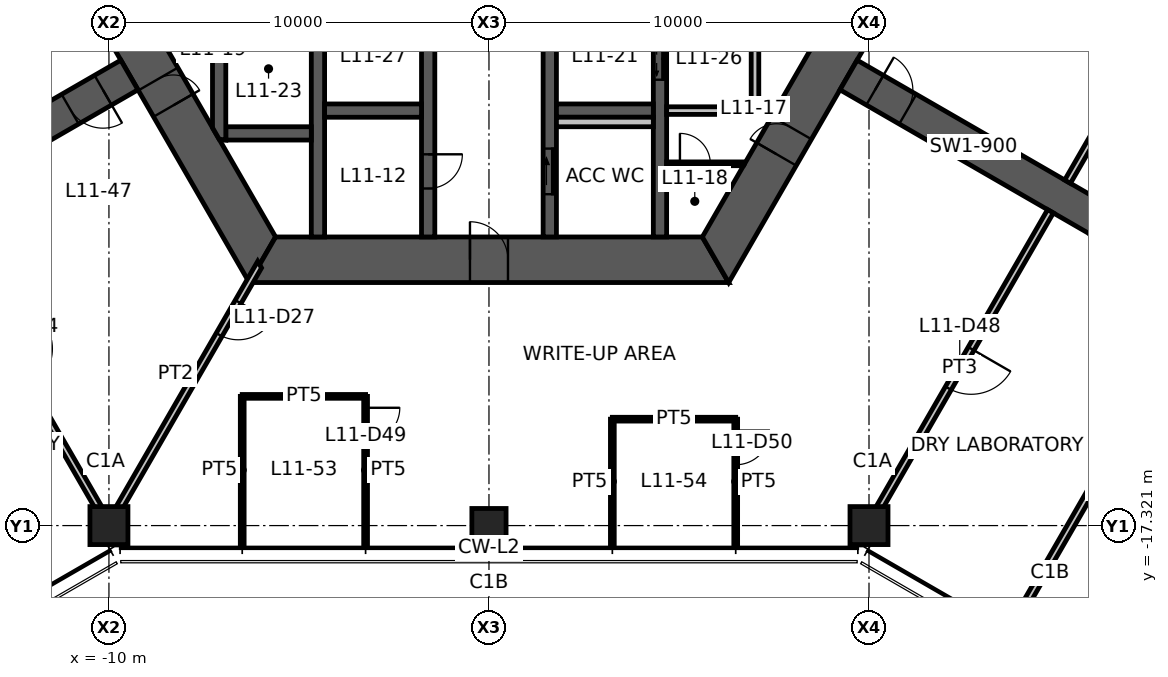
"""IFC4 building model, lengths in metres.
Left out: names, types, materials, properties, quantities, classifications, styles, units other than length and angle.
Written with IfcOpenShell. Run it as: python <this file> out.ifc"""

import sys

from ifc_helpers import new_model, si_unit, direction, frame, frame_2d, origin, origin_2d, place, context, subcontext, project, spatial, polyline, rectangle, hollow_rectangle, outline, extrude, element, fill, save


model = new_model("IFC4")
c1 = context("Model", 3, precision=1e-05, world=origin(), true_north=direction((0.0, 1.0)))
c2 = subcontext(c1, "Body", "Model", "MODEL_VIEW")
j1 = project(units=[si_unit("LENGTHUNIT", "METRE"), si_unit("PLANEANGLEUNIT", "RADIAN")], contexts=[c1])
p1 = place(None, origin())
s1 = spatial("IfcSite", under=j1, at=p1, CompositionType="ELEMENT")
p2 = place(p1, origin())
s2 = spatial("IfcBuilding", under=s1, at=p2, CompositionType="ELEMENT")
p3 = place(p2, frame((0.0, 0.0, 43.6)))
s3 = spatial("IfcBuildingStorey", under=s2, at=p3, CompositionType="ELEMENT", Elevation=43.6)
for number, where, z_axis, x_axis in (
    (1, (-10.0, -17.321, 0.0), (0.0, 0.0, 1.0), (1.0, 0.0, 0.0)),
    (2, (10.0, -17.321, 0.0), (0.0, 0.0, 1.0), (1.0, 0.0, 0.0)),
):
    element("IfcColumn", number, at=place(p3, frame(where, z_axis=z_axis, x_axis=x_axis)), inside=s3, PredefinedType="COLUMN", context=c2, shape_type="SweptSolid", body=[
        extrude(hollow_rectangle(XDim=1.0, YDim=1.0, WallThickness=0.06, at=origin_2d()), origin(), (0.0, 0.0, 1.0), 4.2),
    ])
p4 = place(p3, frame((0.0, -17.321, 0.0), z_axis=(0.0, 0.0, 1.0), x_axis=(1.0, 0.0, 0.0)))
e3 = element("IfcColumn", 3, at=p4, inside=s3, PredefinedType="COLUMN", context=c2, shape_type="SweptSolid", body=[
    extrude(hollow_rectangle(XDim=0.9, YDim=0.9, WallThickness=0.05, at=origin_2d()), origin(), (0.0, 0.0, 1.0), 4.2),
])
p5 = place(p3, frame((-11.922, 0.0, 0.0), z_axis=(0.0, 0.0, 1.0), x_axis=(0.500004296715, -0.866022923061, 0.0)))
e4 = element("IfcWall", 4, at=p5, inside=s3, PredefinedType="SHEAR", context=c2, shape_type="SweptSolid", body=[
    extrude(outline(polyline([(-0.346, -0.6), (6.431, -0.6), (7.231, -0.6), (12.269, -0.6), (11.576, 0.6), (7.231, 0.6), (6.431, 0.6), (0.346, 0.6), (-0.346, -0.6)])), origin(), (0.0, 0.0, 1.0), 4.2),
])
p6 = place(p5, frame((6.431, 0.0, 0.0)))
e5 = element("IfcOpeningElement", 5, at=p6, cuts=e4, PredefinedType="OPENING", context=c2, shape_type="SweptSolid", body=[
    extrude(rectangle(XDim=0.8, YDim=2.1, at=frame_2d((0.4, 1.05))), frame((0.0, 0.61, 0.0), z_axis=(0.0, -1.0, 0.0), x_axis=(1.0, 0.0, 0.0)), (0.0, 0.0, 1.0), 1.22),
])
p7 = place(p3, frame((-5.961, -10.325, 0.0), z_axis=(0.0, 0.0, 1.0), x_axis=(1.0, 0.0, 0.0)))
e6 = element("IfcWall", 6, at=p7, inside=s3, PredefinedType="SHEAR", context=c2, shape_type="SweptSolid", body=[
    extrude(outline(polyline([(-0.346, -0.6), (5.461, -0.6), (6.461, -0.6), (12.269, -0.6), (11.576, 0.6), (6.461, 0.6), (5.461, 0.6), (0.346, 0.6), (-0.346, -0.6)])), origin(), (0.0, 0.0, 1.0), 4.2),
])
p8 = place(p7, frame((5.461, 0.0, 0.0)))
e7 = element("IfcOpeningElement", 7, at=p8, cuts=e6, PredefinedType="OPENING", context=c2, shape_type="SweptSolid", body=[
    extrude(rectangle(XDim=1.0, YDim=2.1, at=frame_2d((0.5, 1.05))), frame((0.0, 0.61, 0.0), z_axis=(0.0, -1.0, 0.0), x_axis=(1.0, 0.0, 0.0)), (0.0, 0.0, 1.0), 1.22),
])
p9 = place(p3, frame((5.961, -10.325, 0.0), z_axis=(0.0, 0.0, 1.0), x_axis=(0.500004296715, 0.866022923061, 0.0)))
e8 = element("IfcWall", 8, at=p9, inside=s3, PredefinedType="SHEAR", context=c2, shape_type="SweptSolid", body=[
    extrude(outline(polyline([(-0.346, -0.6), (3.208, -0.6), (4.009, -0.6), (12.269, -0.6), (11.576, 0.6), (4.009, 0.6), (3.208, 0.6), (0.346, 0.6), (-0.346, -0.6)])), origin(), (0.0, 0.0, 1.0), 4.2),
])
p10 = place(p9, frame((3.208, 0.0, 0.0)))
e9 = element("IfcOpeningElement", 9, at=p10, cuts=e8, PredefinedType="OPENING", context=c2, shape_type="SweptSolid", body=[
    extrude(rectangle(XDim=0.8, YDim=2.1, at=frame_2d((0.4, 1.05))), frame((0.0, 0.61, 0.0), z_axis=(0.0, -1.0, 0.0), x_axis=(1.0, 0.0, 0.0)), (0.0, 0.0, 1.0), 1.22),
])
p11 = place(p3, frame((-9.461, -5.462, 0.0), z_axis=(0.0, 0.0, 1.0), x_axis=(-0.866019116917, -0.500010889016, 0.0)))
e10 = element("IfcWall", 10, at=p11, inside=s3, PredefinedType="SHEAR", context=c2, shape_type="SweptSolid", body=[
    extrude(rectangle(XDim=7.595, YDim=0.9, at=frame_2d((3.798, 0.0))), origin(), (0.0, 0.0, 1.0), 4.2),
])
p12 = place(p11, frame((0.8, 0.0, 0.0)))
e11 = element("IfcOpeningElement", 11, at=p12, cuts=e10, PredefinedType="OPENING", context=c2, shape_type="SweptSolid", body=[
    extrude(rectangle(XDim=1.0, YDim=2.1, at=frame_2d((0.5, 1.05))), frame((0.0, 0.46, 0.0), z_axis=(0.0, -1.0, 0.0), x_axis=(1.0, 0.0, 0.0)), (0.0, 0.0, 1.0), 0.92),
])
p13 = place(p3, frame((9.461, -5.462, 0.0), z_axis=(0.0, 0.0, 1.0), x_axis=(0.866019116917, -0.500010889016, 0.0)))
e12 = element("IfcWall", 12, at=p13, inside=s3, PredefinedType="SHEAR", context=c2, shape_type="SweptSolid", body=[
    extrude(rectangle(XDim=7.595, YDim=0.9, at=frame_2d((3.798, 0.0))), origin(), (0.0, 0.0, 1.0), 4.2),
])
p14 = place(p13, frame((0.8, 0.0, 0.0)))
e13 = element("IfcOpeningElement", 13, at=p14, cuts=e12, PredefinedType="OPENING", context=c2, shape_type="SweptSolid", body=[
    extrude(rectangle(XDim=1.0, YDim=2.1, at=frame_2d((0.5, 1.05))), frame((0.0, 0.46, 0.0), z_axis=(0.0, -1.0, 0.0), x_axis=(1.0, 0.0, 0.0)), (0.0, 0.0, 1.0), 0.92),
])
p15 = place(p3, frame((-1.6, -3.775, 0.0), z_axis=(0.0, 0.0, 1.0), x_axis=(0.0, -1.0, 0.0)))
e14 = element("IfcWall", 14, at=p15, inside=s3, PredefinedType="SHEAR", context=c2, shape_type="SweptSolid", body=[
    extrude(rectangle(XDim=5.95, YDim=0.35, at=frame_2d((2.975, 0.0))), origin(), (0.0, 0.0, 1.0), 4.2),
])
p16 = place(p15, frame((3.775, 0.0, 0.0)))
e15 = element("IfcOpeningElement", 15, at=p16, cuts=e14, PredefinedType="OPENING", context=c2, shape_type="SweptSolid", body=[
    extrude(rectangle(XDim=0.9, YDim=2.1, at=frame_2d((0.45, 1.05))), frame((0.0, 0.185, 0.0), z_axis=(0.0, -1.0, 0.0), x_axis=(1.0, 0.0, 0.0)), (0.0, 0.0, 1.0), 0.37),
])
p17 = place(p3, frame((1.6, -3.775, 0.0), z_axis=(0.0, 0.0, 1.0), x_axis=(0.0, -1.0, 0.0)))
e16 = element("IfcWall", 16, at=p17, inside=s3, PredefinedType="SHEAR", context=c2, shape_type="SweptSolid", body=[
    extrude(rectangle(XDim=5.95, YDim=0.35, at=frame_2d((2.975, 0.0))), origin(), (0.0, 0.0, 1.0), 4.2),
])
p18 = place(p17, frame((3.625, 0.0, 0.0)))
e17 = element("IfcOpeningElement", 17, at=p18, cuts=e16, PredefinedType="OPENING", context=c2, shape_type="SweptSolid", body=[
    extrude(rectangle(XDim=1.2, YDim=2.1, at=frame_2d((0.6, 1.05))), frame((0.0, 0.185, 0.0), z_axis=(0.0, -1.0, 0.0), x_axis=(1.0, 0.0, 0.0)), (0.0, 0.0, 1.0), 0.37),
])
p19 = place(p3, frame((-4.5, -3.775, 0.0), z_axis=(0.0, 0.0, 1.0), x_axis=(0.0, -1.0, 0.0)))
e18 = element("IfcWall", 18, at=p19, inside=s3, PredefinedType="SHEAR", context=c2, shape_type="SweptSolid", body=[
    extrude(rectangle(XDim=5.95, YDim=0.35, at=frame_2d((2.975, 0.0))), origin(), (0.0, 0.0, 1.0), 4.2),
])
p20 = place(p3, frame((4.5, -3.775, 0.0), z_axis=(0.0, 0.0, 1.0), x_axis=(0.0, -1.0, 0.0)))
e19 = element("IfcWall", 19, at=p20, inside=s3, PredefinedType="SHEAR", context=c2, shape_type="SweptSolid", body=[
    extrude(rectangle(XDim=5.95, YDim=0.35, at=frame_2d((2.975, 0.0))), origin(), (0.0, 0.0, 1.0), 4.2),
])
p21 = place(p20, frame((0.712, 0.0, 0.0)))
e20 = element("IfcOpeningElement", 20, at=p21, cuts=e19, PredefinedType="OPENING", context=c2, shape_type="SweptSolid", body=[
    extrude(rectangle(XDim=1.1, YDim=2.1, at=frame_2d((0.55, 1.05))), frame((0.0, 0.185, 0.0), z_axis=(0.0, -1.0, 0.0), x_axis=(1.0, 0.0, 0.0)), (0.0, 0.0, 1.0), 0.37),
])
for number, where, z_axis, x_axis in (
    (21, (-4.325, -6.4, 0.0), (0.0, 0.0, 1.0), (1.0, 0.0, 0.0)),
    (22, (1.775, -6.4, 0.0), (0.0, 0.0, 1.0), (1.0, 0.0, 0.0)),
):
    element("IfcWall", number, at=place(p3, frame(where, z_axis=z_axis, x_axis=x_axis)), inside=s3, PredefinedType="SHEAR", context=c2, shape_type="SweptSolid", body=[
        extrude(rectangle(XDim=2.55, YDim=0.35, at=frame_2d((1.275, 0.0))), origin(), (0.0, 0.0, 1.0), 4.2),
    ])
p22 = place(p3, frame((-6.925, -7.0, 0.0), z_axis=(0.0, 0.0, 1.0), x_axis=(1.0, 0.0, 0.0)))
e23 = element("IfcWall", 23, at=p22, inside=s3, PredefinedType="SHEAR", context=c2, shape_type="SweptSolid", body=[
    extrude(rectangle(XDim=2.25, YDim=0.35, at=frame_2d((1.125, 0.0))), origin(), (0.0, 0.0, 1.0), 4.2),
])
p23 = place(p3, frame((-7.1, -3.775, 0.0), z_axis=(0.0, 0.0, 1.0), x_axis=(0.0, -1.0, 0.0)))
e24 = element("IfcWall", 24, at=p23, inside=s3, PredefinedType="SHEAR", context=c2, shape_type="SweptSolid", body=[
    extrude(outline(polyline([(0.0, -0.175), (3.074, -0.175), (3.377, 0.0), (3.4, 0.175), (0.0, 0.175), (0.0, -0.175)])), origin(), (0.0, 0.0, 1.0), 4.2),
])
p24 = place(p3, frame((4.675, -6.4, 0.0), z_axis=(0.0, 0.0, 1.0), x_axis=(1.0, 0.0, 0.0)))
e25 = element("IfcWall", 25, at=p24, inside=s3, PredefinedType="STANDARD", context=c2, shape_type="SweptSolid", body=[
    extrude(rectangle(XDim=2.425, YDim=0.2, at=frame_2d((1.212, 0.0))), origin(), (0.0, 0.0, 1.0), 4.2),
])
p25 = place(p3, frame((7.0, -3.775, 0.0), z_axis=(0.0, 0.0, 1.0), x_axis=(0.0, -1.0, 0.0)))
e26 = element("IfcWall", 26, at=p25, inside=s3, PredefinedType="STANDARD", context=c2, shape_type="SweptSolid", body=[
    extrude(rectangle(XDim=2.525, YDim=0.2, at=frame_2d((1.263, 0.0))), origin(), (0.0, 0.0, 1.0), 4.2),
])
p26 = place(p3, frame((1.775, -6.7, 0.0), z_axis=(0.0, 0.0, 1.0), x_axis=(1.0, 0.0, 0.0)))
e27 = element("IfcWall", 27, at=p26, inside=s3, PredefinedType="PLUMBINGWALL", context=c2, shape_type="SweptSolid", body=[
    extrude(rectangle(XDim=2.55, YDim=0.25, at=frame_2d((1.275, 0.0))), origin(), (0.0, 0.0, 1.0), 4.2),
])
p27 = place(p3, frame((4.675, -7.8, 0.0), z_axis=(0.0, 0.0, 1.0), x_axis=(1.0, 0.0, 0.0)))
e28 = element("IfcWall", 28, at=p27, inside=s3, PredefinedType="PARTITIONING", context=c2, shape_type="SweptSolid", body=[
    extrude(outline(polyline([(0.0, -0.05), (0.35, -0.05), (1.15, -0.05), (2.022, -0.05), (2.051, 0.0), (2.057, 0.05), (1.15, 0.05), (0.35, 0.05), (0.0, 0.05), (0.0, -0.05)])), origin(), (0.0, 0.0, 1.0), 3.23),
])
p28 = place(p27, frame((0.35, 0.0, 0.0)))
e29 = element("IfcOpeningElement", 29, at=p28, cuts=e28, PredefinedType="OPENING", context=c2, shape_type="SweptSolid", body=[
    extrude(rectangle(XDim=0.8, YDim=2.1, at=frame_2d((0.4, 1.05))), frame((0.0, 0.06, 0.0), z_axis=(0.0, -1.0, 0.0), x_axis=(1.0, 0.0, 0.0)), (0.0, 0.0, 1.0), 0.12),
])
p29 = place(p3, frame((-6.035, -10.453, 0.0), z_axis=(0.0, 0.0, 1.0), x_axis=(-0.499993402427, -0.866029212861, 0.0)))
e30 = element("IfcWall", 30, at=p29, inside=s3, PredefinedType="PARTITIONING", context=c2, shape_type="SweptSolid", body=[
    extrude(outline(polyline([(-0.051, -0.087), (1.129, -0.087), (2.129, -0.087), (7.93, -0.087), (7.93, 0.087), (2.129, 0.087), (1.129, 0.087), (0.051, 0.087), (-0.051, -0.087)])), origin(), (0.0, 0.0, 1.0), 3.33),
])
p30 = place(p29, frame((1.129, 0.0, 0.0)))
e31 = element("IfcOpeningElement", 31, at=p30, cuts=e30, PredefinedType="OPENING", context=c2, shape_type="SweptSolid", body=[
    extrude(rectangle(XDim=1.0, YDim=2.1, at=frame_2d((0.5, 1.05))), frame((0.0, 0.098, 0.0), z_axis=(0.0, -1.0, 0.0), x_axis=(1.0, 0.0, 0.0)), (0.0, 0.0, 1.0), 0.195),
])
p31 = place(p3, frame((-14.775, -9.05, 0.0), z_axis=(0.0, 0.0, 1.0), x_axis=(0.499993908199, -0.866028920859, 0.0)))
e32 = element("IfcWall", 32, at=p31, inside=s3, PredefinedType="PARTITIONING", context=c2, shape_type="SweptSolid", body=[
    extrude(rectangle(XDim=9.55, YDim=0.175, at=frame_2d((4.775, 0.0))), origin(), (0.0, 0.0, 1.0), 3.238),
])
p32 = place(p31, frame((4.175, 0.0, 0.0)))
e33 = element("IfcOpeningElement", 33, at=p32, cuts=e32, PredefinedType="OPENING", context=c2, shape_type="SweptSolid", body=[
    extrude(rectangle(XDim=1.2, YDim=2.1, at=frame_2d((0.6, 1.05))), frame((0.0, 0.098, 0.0), z_axis=(0.0, -1.0, 0.0), x_axis=(1.0, 0.0, 0.0)), (0.0, 0.0, 1.0), 0.195),
])
p33 = place(p3, frame((15.225, -8.271, 0.0), z_axis=(0.0, 0.0, 1.0), x_axis=(0.499993908199, 0.866028920859, 0.0)))
e34 = element("IfcWall", 34, at=p33, inside=s3, PredefinedType="PARTITIONING", context=c2, shape_type="SweptSolid", body=[
    extrude(rectangle(XDim=9.55, YDim=0.175, at=frame_2d((4.775, 0.0))), origin(), (0.0, 0.0, 1.0), 3.238),
])
p34 = place(p33, frame((4.175, 0.0, 0.0)))
e35 = element("IfcOpeningElement", 35, at=p34, cuts=e34, PredefinedType="OPENING", context=c2, shape_type="SweptSolid", body=[
    extrude(rectangle(XDim=1.2, YDim=2.1, at=frame_2d((0.6, 1.05))), frame((0.0, 0.098, 0.0), z_axis=(0.0, -1.0, 0.0), x_axis=(1.0, 0.0, 0.0)), (0.0, 0.0, 1.0), 0.195),
])
p35 = place(p3, frame((14.775, -9.05, 0.0), z_axis=(0.0, 0.0, 1.0), x_axis=(-0.499993908199, -0.866028920859, 0.0)))
e36 = element("IfcWall", 36, at=p35, inside=s3, PredefinedType="PARTITIONING", context=c2, shape_type="SweptSolid", body=[
    extrude(rectangle(XDim=9.55, YDim=0.175, at=frame_2d((4.775, 0.0))), origin(), (0.0, 0.0, 1.0), 3.238),
])
p36 = place(p35, frame((4.175, 0.0, 0.0)))
e37 = element("IfcOpeningElement", 37, at=p36, cuts=e36, PredefinedType="OPENING", context=c2, shape_type="SweptSolid", body=[
    extrude(rectangle(XDim=1.2, YDim=2.1, at=frame_2d((0.6, 1.05))), frame((0.0, 0.098, 0.0), z_axis=(0.0, -1.0, 0.0), x_axis=(1.0, 0.0, 0.0)), (0.0, 0.0, 1.0), 0.195),
])
p37 = place(p3, frame((-6.493, -17.801, 0.0), z_axis=(0.0, 0.0, 1.0), x_axis=(0.0, 1.0, 0.0)))
e38 = element("IfcWall", 38, at=p37, inside=s3, PredefinedType="PARTITIONING", context=c2, shape_type="SweptSolid", body=[
    extrude(rectangle(XDim=3.88, YDim=0.1, at=frame_2d((1.94, 0.0))), origin(), (0.0, 0.0, 1.0), 3.23),
])
p38 = place(p3, frame((-6.493, -13.92, 0.0), z_axis=(0.0, 0.0, 1.0), x_axis=(1.0, 0.0, 0.0)))
e39 = element("IfcWall", 39, at=p38, inside=s3, PredefinedType="PARTITIONING", context=c2, shape_type="SweptSolid", body=[
    extrude(rectangle(XDim=3.247, YDim=0.1, at=frame_2d((1.623, 0.0))), origin(), (0.0, 0.0, 1.0), 3.23),
])
p39 = place(p3, frame((-3.246, -13.92, 0.0), z_axis=(0.0, 0.0, 1.0), x_axis=(0.0, -1.0, 0.0)))
e40 = element("IfcWall", 40, at=p39, inside=s3, PredefinedType="PARTITIONING", context=c2, shape_type="SweptSolid", body=[
    extrude(rectangle(XDim=3.88, YDim=0.1, at=frame_2d((1.94, 0.0))), origin(), (0.0, 0.0, 1.0), 3.23),
])
p40 = place(p39, frame((0.3, 0.0, 0.0)))
e41 = element("IfcOpeningElement", 41, at=p40, cuts=e40, PredefinedType="OPENING", context=c2, shape_type="SweptSolid", body=[
    extrude(rectangle(XDim=0.9, YDim=2.1, at=frame_2d((0.45, 1.05))), frame((0.0, 0.06, 0.0), z_axis=(0.0, -1.0, 0.0), x_axis=(1.0, 0.0, 0.0)), (0.0, 0.0, 1.0), 0.12),
])
p41 = place(p3, frame((3.246, -17.801, 0.0), z_axis=(0.0, 0.0, 1.0), x_axis=(0.0, 1.0, 0.0)))
e42 = element("IfcWall", 42, at=p41, inside=s3, PredefinedType="PARTITIONING", context=c2, shape_type="SweptSolid", body=[
    extrude(rectangle(XDim=3.28, YDim=0.1, at=frame_2d((1.64, 0.0))), origin(), (0.0, 0.0, 1.0), 3.23),
])
p42 = place(p3, frame((3.246, -14.521, 0.0), z_axis=(0.0, 0.0, 1.0), x_axis=(1.0, 0.0, 0.0)))
e43 = element("IfcWall", 43, at=p42, inside=s3, PredefinedType="PARTITIONING", context=c2, shape_type="SweptSolid", body=[
    extrude(rectangle(XDim=3.247, YDim=0.1, at=frame_2d((1.623, 0.0))), origin(), (0.0, 0.0, 1.0), 3.23),
])
p43 = place(p3, frame((6.493, -14.521, 0.0), z_axis=(0.0, 0.0, 1.0), x_axis=(0.0, -1.0, 0.0)))
e44 = element("IfcWall", 44, at=p43, inside=s3, PredefinedType="PARTITIONING", context=c2, shape_type="SweptSolid", body=[
    extrude(rectangle(XDim=3.28, YDim=0.1, at=frame_2d((1.64, 0.0))), origin(), (0.0, 0.0, 1.0), 3.23),
])
p44 = place(p43, frame((0.3, 0.0, 0.0)))
e45 = element("IfcOpeningElement", 45, at=p44, cuts=e44, PredefinedType="OPENING", context=c2, shape_type="SweptSolid", body=[
    extrude(rectangle(XDim=0.9, YDim=2.1, at=frame_2d((0.45, 1.05))), frame((0.0, 0.06, 0.0), z_axis=(0.0, -1.0, 0.0), x_axis=(1.0, 0.0, 0.0)), (0.0, 0.0, 1.0), 0.12),
])
p45 = place(p3, frame((18.759, -11.35, 0.0), z_axis=(0.0, 0.0, 1.0), x_axis=(-0.500005203629, -0.866022399447, 0.0)))
e46 = element("IfcWall", 46, at=p45, inside=s3, PredefinedType="PARTITIONING", context=c2, shape_type="SweptSolid", body=[
    extrude(rectangle(XDim=10.14, YDim=0.175, at=frame_2d((5.07, 0.0))), origin(), (0.0, 0.0, 1.0), 4.03),
])
p46 = place(p45, frame((4.025, 0.0, 0.0)))
e47 = element("IfcOpeningElement", 47, at=p46, cuts=e46, PredefinedType="OPENING", context=c2, shape_type="SweptSolid", body=[
    extrude(rectangle(XDim=1.5, YDim=2.1, at=frame_2d((0.75, 1.05))), frame((0.0, 0.098, 0.0), z_axis=(0.0, -1.0, 0.0), x_axis=(1.0, 0.0, 0.0)), (0.0, 0.0, 1.0), 0.195),
])
p47 = place(p8, origin())
e48 = element("IfcDoor", 48, at=p47, inside=s3, OperationType="SINGLE_SWING_LEFT", PredefinedType="DOOR", context=c2, shape_type="SweptSolid", body=[
    extrude(rectangle(XDim=1.0, YDim=2.1, at=frame_2d((0.5, 1.05))), frame((0.0, 0.025, 0.0), z_axis=(0.0, -1.0, 0.0), x_axis=(1.0, 0.0, 0.0)), (0.0, 0.0, 1.0), 0.05),
])
fill(e7, e48)
p48 = place(p10, origin())
e49 = element("IfcDoor", 49, at=p48, inside=s3, OperationType="SINGLE_SWING_LEFT", PredefinedType="DOOR", context=c2, shape_type="SweptSolid", body=[
    extrude(rectangle(XDim=0.8, YDim=2.1, at=frame_2d((0.4, 1.05))), frame((0.0, 0.025, 0.0), z_axis=(0.0, -1.0, 0.0), x_axis=(1.0, 0.0, 0.0)), (0.0, 0.0, 1.0), 0.05),
])
fill(e9, e49)
p49 = place(p6, origin())
e50 = element("IfcDoor", 50, at=p49, inside=s3, OperationType="SINGLE_SWING_RIGHT", PredefinedType="DOOR", context=c2, shape_type="SweptSolid", body=[
    extrude(rectangle(XDim=0.8, YDim=2.1, at=frame_2d((0.4, 1.05))), frame((0.0, 0.025, 0.0), z_axis=(0.0, -1.0, 0.0), x_axis=(1.0, 0.0, 0.0)), (0.0, 0.0, 1.0), 0.05),
])
fill(e5, e50)
p50 = place(p18, origin())
e51 = element("IfcDoor", 51, at=p50, inside=s3, OperationType="SLIDING_TO_LEFT", PredefinedType="DOOR", context=c2, shape_type="SweptSolid", body=[
    extrude(rectangle(XDim=1.2, YDim=2.1, at=frame_2d((0.6, 1.05))), frame((0.0, 0.025, 0.0), z_axis=(0.0, -1.0, 0.0), x_axis=(1.0, 0.0, 0.0)), (0.0, 0.0, 1.0), 0.05),
])
fill(e17, e51)
p51 = place(p16, origin())
e52 = element("IfcDoor", 52, at=p51, inside=s3, OperationType="SINGLE_SWING_LEFT", PredefinedType="DOOR", context=c2, shape_type="SweptSolid", body=[
    extrude(rectangle(XDim=0.9, YDim=2.1, at=frame_2d((0.45, 1.05))), frame((0.0, 0.025, 0.0), z_axis=(0.0, -1.0, 0.0), x_axis=(1.0, 0.0, 0.0)), (0.0, 0.0, 1.0), 0.05),
])
fill(e15, e52)
p52 = place(p12, origin())
e53 = element("IfcDoor", 53, at=p52, inside=s3, OperationType="SINGLE_SWING_LEFT", PredefinedType="DOOR", context=c2, shape_type="SweptSolid", body=[
    extrude(rectangle(XDim=1.0, YDim=2.1, at=frame_2d((0.5, 1.05))), frame((0.0, 0.025, 0.0), z_axis=(0.0, -1.0, 0.0), x_axis=(1.0, 0.0, 0.0)), (0.0, 0.0, 1.0), 0.05),
])
fill(e11, e53)
p53 = place(p14, origin())
e54 = element("IfcDoor", 54, at=p53, inside=s3, OperationType="SINGLE_SWING_LEFT", PredefinedType="DOOR", context=c2, shape_type="SweptSolid", body=[
    extrude(rectangle(XDim=1.0, YDim=2.1, at=frame_2d((0.5, 1.05))), frame((0.0, 0.025, 0.0), z_axis=(0.0, -1.0, 0.0), x_axis=(1.0, 0.0, 0.0)), (0.0, 0.0, 1.0), 0.05),
])
fill(e13, e54)
p54 = place(p28, origin())
e55 = element("IfcDoor", 55, at=p54, inside=s3, OperationType="SINGLE_SWING_LEFT", PredefinedType="DOOR", context=c2, shape_type="SweptSolid", body=[
    extrude(rectangle(XDim=0.8, YDim=2.1, at=frame_2d((0.4, 1.05))), frame((0.0, 0.025, 0.0), z_axis=(0.0, -1.0, 0.0), x_axis=(1.0, 0.0, 0.0)), (0.0, 0.0, 1.0), 0.05),
])
fill(e29, e55)
p55 = place(p30, origin())
e56 = element("IfcDoor", 56, at=p55, inside=s3, OperationType="SINGLE_SWING_LEFT", PredefinedType="DOOR", context=c2, shape_type="SweptSolid", body=[
    extrude(rectangle(XDim=1.0, YDim=2.1, at=frame_2d((0.5, 1.05))), frame((0.0, 0.025, 0.0), z_axis=(0.0, -1.0, 0.0), x_axis=(1.0, 0.0, 0.0)), (0.0, 0.0, 1.0), 0.05),
])
fill(e31, e56)
p56 = place(p36, origin())
e57 = element("IfcDoor", 57, at=p56, inside=s3, OperationType="DOUBLE_DOOR_SINGLE_SWING", PredefinedType="DOOR", context=c2, shape_type="SweptSolid", body=[
    extrude(rectangle(XDim=1.2, YDim=2.1, at=frame_2d((0.6, 1.05))), frame((0.0, 0.025, 0.0), z_axis=(0.0, -1.0, 0.0), x_axis=(1.0, 0.0, 0.0)), (0.0, 0.0, 1.0), 0.05),
])
fill(e37, e57)
p57 = place(p40, origin())
e58 = element("IfcDoor", 58, at=p57, inside=s3, OperationType="SINGLE_SWING_LEFT", PredefinedType="DOOR", context=c2, shape_type="SweptSolid", body=[
    extrude(rectangle(XDim=0.9, YDim=2.1, at=frame_2d((0.45, 1.05))), frame((0.0, 0.025, 0.0), z_axis=(0.0, -1.0, 0.0), x_axis=(1.0, 0.0, 0.0)), (0.0, 0.0, 1.0), 0.05),
])
fill(e41, e58)
p58 = place(p44, origin())
e59 = element("IfcDoor", 59, at=p58, inside=s3, OperationType="SINGLE_SWING_LEFT", PredefinedType="DOOR", context=c2, shape_type="SweptSolid", body=[
    extrude(rectangle(XDim=0.9, YDim=2.1, at=frame_2d((0.45, 1.05))), frame((0.0, 0.025, 0.0), z_axis=(0.0, -1.0, 0.0), x_axis=(1.0, 0.0, 0.0)), (0.0, 0.0, 1.0), 0.05),
])
fill(e45, e59)
p59 = place(p21, origin())
e60 = element("IfcDoor", 60, at=p59, inside=s3, OperationType="DOUBLE_DOOR_SLIDING", PredefinedType="DOOR", context=c2, shape_type="SweptSolid", body=[
    extrude(rectangle(XDim=1.1, YDim=2.1, at=frame_2d((0.55, 1.05))), frame((0.0, 0.025, 0.0), z_axis=(0.0, -1.0, 0.0), x_axis=(1.0, 0.0, 0.0)), (0.0, 0.0, 1.0), 0.05),
])
fill(e20, e60)
save(model, sys.argv[1])
